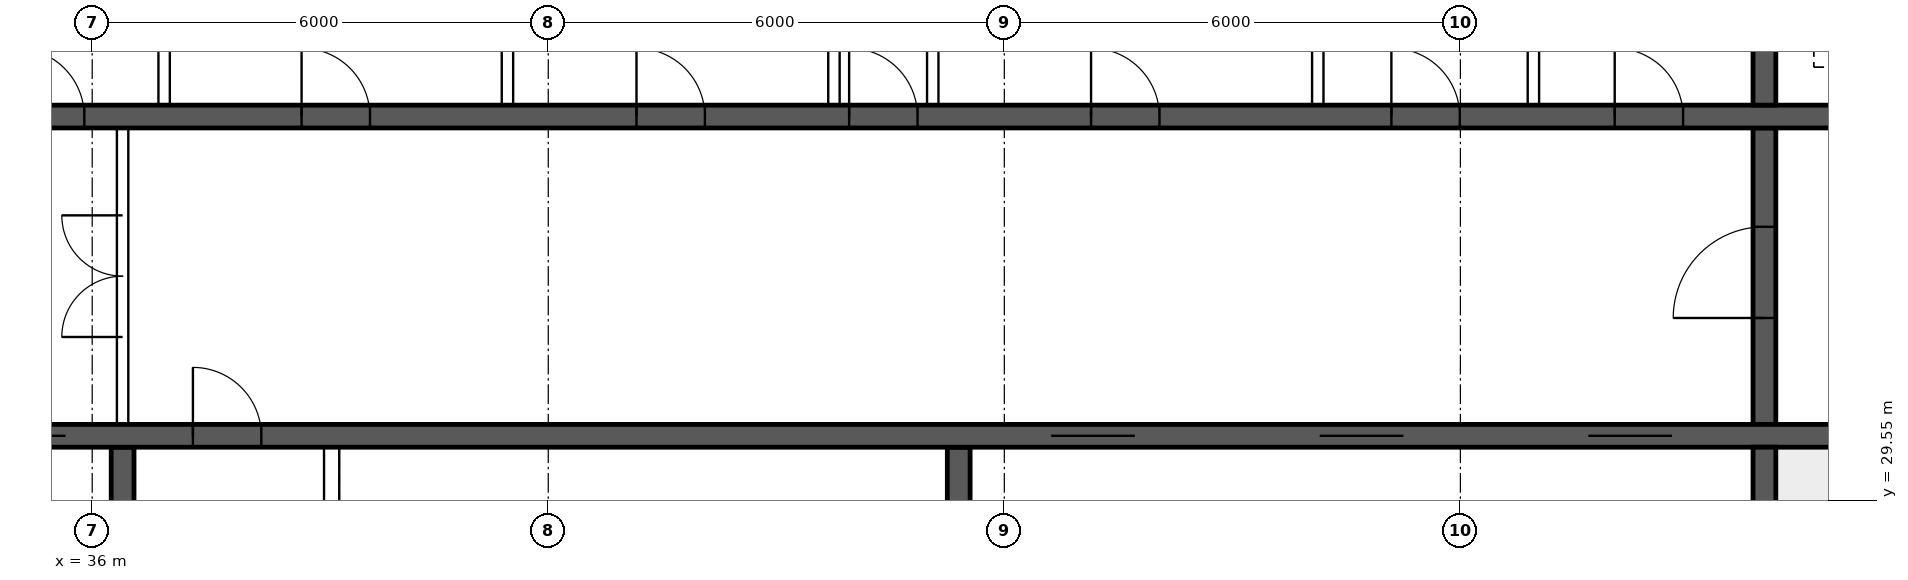
"""IFC4 building model, lengths in metres.
Left out: names, types, materials, properties, quantities, classifications, styles, units other than length and angle.
Written with IfcOpenShell. Run it as: python <this file> out.ifc"""

import sys

from ifc_helpers import new_model, si_unit, direction, frame, frame_2d, origin, place, context, subcontext, project, spatial, rectangle, extrude, element, fill, save


model = new_model("IFC4")
c1 = context("Model", 3, precision=1e-05, world=origin(), true_north=direction((0.0, 1.0)))
c2 = subcontext(c1, "Body", "Model", "MODEL_VIEW")
j1 = project(units=[si_unit("LENGTHUNIT", "METRE"), si_unit("PLANEANGLEUNIT", "RADIAN")], contexts=[c1])
p1 = place(None, origin())
s1 = spatial("IfcSite", under=j1, at=p1, CompositionType="ELEMENT")
p2 = place(p1, origin())
s2 = spatial("IfcBuilding", under=s1, at=p2, CompositionType="ELEMENT")
p3 = place(p2, frame((0.0, 0.0, 95.65)))
s3 = spatial("IfcBuildingStorey", under=s2, at=p3, CompositionType="ELEMENT", Elevation=95.65)
p4 = place(p3, frame((18.475, 30.4, 0.0), z_axis=(0.0, 0.0, 1.0), x_axis=(1.0, 0.0, 0.0)))
e1 = element("IfcWall", 1, at=p4, inside=s3, PredefinedType="SHEAR", context=c2, shape_type="SweptSolid", body=[
    extrude(rectangle(XDim=47.05, YDim=0.3, at=frame_2d((23.525, 0.0))), origin(), (0.0, 0.0, 1.0), 3.75),
])
p5 = place(p4, frame((0.4, 0.0, 0.0)))
e2 = element("IfcOpeningElement", 2, at=p5, cuts=e1, PredefinedType="OPENING", context=c2, shape_type="SweptSolid", body=[
    extrude(rectangle(XDim=1.0, YDim=2.1, at=frame_2d((0.5, 1.05))), frame((0.0, 0.16, 0.0), z_axis=(0.0, -1.0, 0.0), x_axis=(1.0, 0.0, 0.0)), (0.0, 0.0, 1.0), 0.32),
])
p6 = place(p4, frame((45.65, 0.0, 0.0)))
e3 = element("IfcOpeningElement", 3, at=p6, cuts=e1, PredefinedType="OPENING", context=c2, shape_type="SweptSolid", body=[
    extrude(rectangle(XDim=1.0, YDim=2.1, at=frame_2d((0.5, 1.05))), frame((0.0, 0.16, 0.0), z_axis=(0.0, -1.0, 0.0), x_axis=(1.0, 0.0, 0.0)), (0.0, 0.0, 1.0), 0.32),
])
p7 = place(p4, frame((8.275, 0.0, 0.0)))
e4 = element("IfcOpeningElement", 4, at=p7, cuts=e1, PredefinedType="OPENING", context=c2, shape_type="SweptSolid", body=[
    extrude(rectangle(XDim=1.1, YDim=2.1, at=frame_2d((0.55, 1.05))), frame((0.0, 0.16, 0.0), z_axis=(0.0, -1.0, 0.0), x_axis=(1.0, 0.0, 0.0)), (0.0, 0.0, 1.0), 0.32),
])
p8 = place(p4, frame((10.875, 0.0, 0.0)))
e5 = element("IfcOpeningElement", 5, at=p8, cuts=e1, PredefinedType="OPENING", context=c2, shape_type="SweptSolid", body=[
    extrude(rectangle(XDim=1.1, YDim=2.1, at=frame_2d((0.55, 1.05))), frame((0.0, 0.16, 0.0), z_axis=(0.0, -1.0, 0.0), x_axis=(1.0, 0.0, 0.0)), (0.0, 0.0, 1.0), 0.32),
])
p9 = place(p4, frame((13.475, 0.0, 0.0)))
e6 = element("IfcOpeningElement", 6, at=p9, cuts=e1, PredefinedType="OPENING", context=c2, shape_type="SweptSolid", body=[
    extrude(rectangle(XDim=1.1, YDim=2.1, at=frame_2d((0.55, 1.05))), frame((0.0, 0.16, 0.0), z_axis=(0.0, -1.0, 0.0), x_axis=(1.0, 0.0, 0.0)), (0.0, 0.0, 1.0), 0.32),
])
p10 = place(p4, frame((16.075, 0.0, 0.0)))
e7 = element("IfcOpeningElement", 7, at=p10, cuts=e1, PredefinedType="OPENING", context=c2, shape_type="SweptSolid", body=[
    extrude(rectangle(XDim=1.1, YDim=2.1, at=frame_2d((0.55, 1.05))), frame((0.0, 0.16, 0.0), z_axis=(0.0, -1.0, 0.0), x_axis=(1.0, 0.0, 0.0)), (0.0, 0.0, 1.0), 0.32),
])
p11 = place(p4, frame((18.85, 0.0, 0.0)))
e8 = element("IfcOpeningElement", 8, at=p11, cuts=e1, PredefinedType="OPENING", context=c2, shape_type="SweptSolid", body=[
    extrude(rectangle(XDim=0.9, YDim=2.1, at=frame_2d((0.45, 1.05))), frame((0.0, 0.16, 0.0), z_axis=(0.0, -1.0, 0.0), x_axis=(1.0, 0.0, 0.0)), (0.0, 0.0, 1.0), 0.32),
])
p12 = place(p4, frame((30.142, 0.0, 0.0)))
e9 = element("IfcOpeningElement", 9, at=p12, cuts=e1, PredefinedType="OPENING", context=c2, shape_type="SweptSolid", body=[
    extrude(rectangle(XDim=1.1, YDim=2.1, at=frame_2d((0.55, 1.05))), frame((0.0, 0.16, 0.0), z_axis=(0.0, -1.0, 0.0), x_axis=(1.0, 0.0, 0.0)), (0.0, 0.0, 1.0), 0.32),
])
p13 = place(p4, frame((33.675, 0.0, 0.0)))
e10 = element("IfcOpeningElement", 10, at=p13, cuts=e1, PredefinedType="OPENING", context=c2, shape_type="SweptSolid", body=[
    extrude(rectangle(XDim=1.1, YDim=2.1, at=frame_2d((0.55, 1.05))), frame((0.0, 0.16, 0.0), z_axis=(0.0, -1.0, 0.0), x_axis=(1.0, 0.0, 0.0)), (0.0, 0.0, 1.0), 0.32),
])
p14 = place(p4, frame((37.208, 0.0, 0.0)))
e11 = element("IfcOpeningElement", 11, at=p14, cuts=e1, PredefinedType="OPENING", context=c2, shape_type="SweptSolid", body=[
    extrude(rectangle(XDim=1.1, YDim=2.1, at=frame_2d((0.55, 1.05))), frame((0.0, 0.16, 0.0), z_axis=(0.0, -1.0, 0.0), x_axis=(1.0, 0.0, 0.0)), (0.0, 0.0, 1.0), 0.32),
])
p15 = place(p3, frame((18.475, 34.6, 0.0), z_axis=(0.0, 0.0, 1.0), x_axis=(1.0, 0.0, 0.0)))
e12 = element("IfcWall", 12, at=p15, inside=s3, PredefinedType="SHEAR", context=c2, shape_type="SweptSolid", body=[
    extrude(rectangle(XDim=47.05, YDim=0.3, at=frame_2d((23.525, 0.0))), origin(), (0.0, 0.0, 1.0), 3.75),
])
p16 = place(p15, frame((0.9, 0.0, 0.0)))
e13 = element("IfcOpeningElement", 13, at=p16, cuts=e12, PredefinedType="OPENING", context=c2, shape_type="SweptSolid", body=[
    extrude(rectangle(XDim=1.1, YDim=2.1, at=frame_2d((0.55, 1.05))), frame((0.0, 0.16, 0.0), z_axis=(0.0, -1.0, 0.0), x_axis=(1.0, 0.0, 0.0)), (0.0, 0.0, 1.0), 0.32),
])
p17 = place(p15, frame((45.05, 0.0, 0.0)))
e14 = element("IfcOpeningElement", 14, at=p17, cuts=e12, PredefinedType="OPENING", context=c2, shape_type="SweptSolid", body=[
    extrude(rectangle(XDim=1.1, YDim=2.1, at=frame_2d((0.55, 1.05))), frame((0.0, 0.16, 0.0), z_axis=(0.0, -1.0, 0.0), x_axis=(1.0, 0.0, 0.0)), (0.0, 0.0, 1.0), 0.32),
])
p18 = place(p15, frame((4.125, 0.0, 0.0)))
e15 = element("IfcOpeningElement", 15, at=p18, cuts=e12, PredefinedType="OPENING", context=c2, shape_type="SweptSolid", body=[
    extrude(rectangle(XDim=0.9, YDim=2.1, at=frame_2d((0.45, 1.05))), frame((0.0, 0.16, 0.0), z_axis=(0.0, -1.0, 0.0), x_axis=(1.0, 0.0, 0.0)), (0.0, 0.0, 1.0), 0.32),
])
p19 = place(p15, frame((42.025, 0.0, 0.0)))
e16 = element("IfcOpeningElement", 16, at=p19, cuts=e12, PredefinedType="OPENING", context=c2, shape_type="SweptSolid", body=[
    extrude(rectangle(XDim=0.9, YDim=2.1, at=frame_2d((0.45, 1.05))), frame((0.0, 0.16, 0.0), z_axis=(0.0, -1.0, 0.0), x_axis=(1.0, 0.0, 0.0)), (0.0, 0.0, 1.0), 0.32),
])
p20 = place(p15, frame((8.9, 0.0, 0.0)))
e17 = element("IfcOpeningElement", 17, at=p20, cuts=e12, PredefinedType="OPENING", context=c2, shape_type="SweptSolid", body=[
    extrude(rectangle(XDim=0.9, YDim=2.1, at=frame_2d((0.45, 1.05))), frame((0.0, 0.16, 0.0), z_axis=(0.0, -1.0, 0.0), x_axis=(1.0, 0.0, 0.0)), (0.0, 0.0, 1.0), 0.32),
])
p21 = place(p15, frame((12.874, 0.0, 0.0)))
e18 = element("IfcOpeningElement", 18, at=p21, cuts=e12, PredefinedType="OPENING", context=c2, shape_type="SweptSolid", body=[
    extrude(rectangle(XDim=0.9, YDim=2.1, at=frame_2d((0.45, 1.05))), frame((0.0, 0.16, 0.0), z_axis=(0.0, -1.0, 0.0), x_axis=(1.0, 0.0, 0.0)), (0.0, 0.0, 1.0), 0.32),
])
p22 = place(p15, frame((16.521, 0.0, 0.0)))
e19 = element("IfcOpeningElement", 19, at=p22, cuts=e12, PredefinedType="OPENING", context=c2, shape_type="SweptSolid", body=[
    extrude(rectangle(XDim=0.9, YDim=2.1, at=frame_2d((0.45, 1.05))), frame((0.0, 0.16, 0.0), z_axis=(0.0, -1.0, 0.0), x_axis=(1.0, 0.0, 0.0)), (0.0, 0.0, 1.0), 0.32),
])
p23 = place(p15, frame((20.28, 0.0, 0.0)))
e20 = element("IfcOpeningElement", 20, at=p23, cuts=e12, PredefinedType="OPENING", context=c2, shape_type="SweptSolid", body=[
    extrude(rectangle(XDim=0.9, YDim=2.1, at=frame_2d((0.45, 1.05))), frame((0.0, 0.16, 0.0), z_axis=(0.0, -1.0, 0.0), x_axis=(1.0, 0.0, 0.0)), (0.0, 0.0, 1.0), 0.32),
])
p24 = place(p15, frame((24.686, 0.0, 0.0)))
e21 = element("IfcOpeningElement", 21, at=p24, cuts=e12, PredefinedType="OPENING", context=c2, shape_type="SweptSolid", body=[
    extrude(rectangle(XDim=0.9, YDim=2.1, at=frame_2d((0.45, 1.05))), frame((0.0, 0.16, 0.0), z_axis=(0.0, -1.0, 0.0), x_axis=(1.0, 0.0, 0.0)), (0.0, 0.0, 1.0), 0.32),
])
p25 = place(p15, frame((27.483, 0.0, 0.0)))
e22 = element("IfcOpeningElement", 22, at=p25, cuts=e12, PredefinedType="OPENING", context=c2, shape_type="SweptSolid", body=[
    extrude(rectangle(XDim=0.9, YDim=2.1, at=frame_2d((0.45, 1.05))), frame((0.0, 0.16, 0.0), z_axis=(0.0, -1.0, 0.0), x_axis=(1.0, 0.0, 0.0)), (0.0, 0.0, 1.0), 0.32),
])
p26 = place(p15, frame((30.666, 0.0, 0.0)))
e23 = element("IfcOpeningElement", 23, at=p26, cuts=e12, PredefinedType="OPENING", context=c2, shape_type="SweptSolid", body=[
    extrude(rectangle(XDim=0.9, YDim=2.1, at=frame_2d((0.45, 1.05))), frame((0.0, 0.16, 0.0), z_axis=(0.0, -1.0, 0.0), x_axis=(1.0, 0.0, 0.0)), (0.0, 0.0, 1.0), 0.32),
])
p27 = place(p15, frame((34.617, 0.0, 0.0)))
e24 = element("IfcOpeningElement", 24, at=p27, cuts=e12, PredefinedType="OPENING", context=c2, shape_type="SweptSolid", body=[
    extrude(rectangle(XDim=0.9, YDim=2.1, at=frame_2d((0.45, 1.05))), frame((0.0, 0.16, 0.0), z_axis=(0.0, -1.0, 0.0), x_axis=(1.0, 0.0, 0.0)), (0.0, 0.0, 1.0), 0.32),
])
p28 = place(p15, frame((37.555, 0.0, 0.0)))
e25 = element("IfcOpeningElement", 25, at=p28, cuts=e12, PredefinedType="OPENING", context=c2, shape_type="SweptSolid", body=[
    extrude(rectangle(XDim=0.9, YDim=2.1, at=frame_2d((0.45, 1.05))), frame((0.0, 0.16, 0.0), z_axis=(0.0, -1.0, 0.0), x_axis=(1.0, 0.0, 0.0)), (0.0, 0.0, 1.0), 0.32),
])
p29 = place(p3, frame((58.0, 26.275, 0.0), z_axis=(0.0, 0.0, 1.0), x_axis=(0.0, 1.0, 0.0)))
e26 = element("IfcWall", 26, at=p29, inside=s3, PredefinedType="SHEAR", context=c2, shape_type="SweptSolid", body=[
    extrude(rectangle(XDim=3.975, YDim=0.3, at=frame_2d((1.988, 0.0))), origin(), (0.0, 0.0, 1.0), 3.75),
])
p30 = place(p3, frame((58.0, 30.55, 0.0), z_axis=(0.0, 0.0, 1.0), x_axis=(0.0, 1.0, 0.0)))
e27 = element("IfcWall", 27, at=p30, inside=s3, PredefinedType="SHEAR", context=c2, shape_type="SweptSolid", body=[
    extrude(rectangle(XDim=3.9, YDim=0.3, at=frame_2d((1.95, 0.0))), origin(), (0.0, 0.0, 1.0), 3.75),
])
p31 = place(p30, frame((1.4, 0.0, 0.0)))
e28 = element("IfcOpeningElement", 28, at=p31, cuts=e27, PredefinedType="OPENING", context=c2, shape_type="SweptSolid", body=[
    extrude(rectangle(XDim=1.2, YDim=2.1, at=frame_2d((0.6, 1.05))), frame((0.0, 0.16, 0.0), z_axis=(0.0, -1.0, 0.0), x_axis=(1.0, 0.0, 0.0)), (0.0, 0.0, 1.0), 0.32),
])
p32 = place(p3, frame((58.0, 34.75, 0.0), z_axis=(0.0, 0.0, 1.0), x_axis=(0.0, 1.0, 0.0)))
e29 = element("IfcWall", 29, at=p32, inside=s3, PredefinedType="SHEAR", context=c2, shape_type="SweptSolid", body=[
    extrude(rectangle(XDim=2.975, YDim=0.3, at=frame_2d((1.488, 0.0))), origin(), (0.0, 0.0, 1.0), 3.75),
])
for number, where, z_axis, x_axis in (
    (30, (36.4, 26.275, 0.0), (0.0, 0.0, 1.0), (0.0, 1.0, 0.0)),
    (31, (47.4, 26.275, 0.0), (0.0, 0.0, 1.0), (0.0, 1.0, 0.0)),
):
    element("IfcWall", number, at=place(p3, frame(where, z_axis=z_axis, x_axis=x_axis)), inside=s3, PredefinedType="SHEAR", context=c2, shape_type="SweptSolid", body=[
        extrude(rectangle(XDim=3.975, YDim=0.3, at=frame_2d((1.988, 0.0))), origin(), (0.0, 0.0, 1.0), 3.75),
    ])
p33 = place(p3, frame((36.4, 30.55, 0.0), z_axis=(0.0, 0.0, 1.0), x_axis=(0.0, 1.0, 0.0)))
e32 = element("IfcWall", 32, at=p33, inside=s3, PredefinedType="SOLIDWALL", context=c2, shape_type="SweptSolid", body=[
    extrude(rectangle(XDim=3.9, YDim=0.15, at=frame_2d((1.95, 0.0))), origin(), (0.0, 0.0, 1.0), 3.3),
])
p34 = place(p33, frame((1.15, 0.0, 0.0)))
e33 = element("IfcOpeningElement", 33, at=p34, cuts=e32, PredefinedType="OPENING", context=c2, shape_type="SweptSolid", body=[
    extrude(rectangle(XDim=1.6, YDim=2.1, at=frame_2d((0.8, 1.05))), frame((0.0, 0.085, 0.0), z_axis=(0.0, -1.0, 0.0), x_axis=(1.0, 0.0, 0.0)), (0.0, 0.0, 1.0), 0.17),
])
for number, where, z_axis, x_axis in (
    (34, (36.946, 34.75, 0.0), (0.0, 0.0, 1.0), (0.0, 1.0, 0.0)),
    (35, (41.463, 34.75, 0.0), (0.0, 0.0, 1.0), (0.0, 1.0, 0.0)),
    (36, (45.758, 34.75, 0.0), (0.0, 0.0, 1.0), (0.0, 1.0, 0.0)),
    (37, (47.058, 34.75, 0.0), (0.0, 0.0, 1.0), (0.0, 1.0, 0.0)),
    (38, (52.124, 34.75, 0.0), (0.0, 0.0, 1.0), (0.0, 1.0, 0.0)),
    (39, (54.961, 34.75, 0.0), (0.0, 0.0, 1.0), (0.0, 1.0, 0.0)),
):
    element("IfcWall", number, at=place(p3, frame(where, z_axis=z_axis, x_axis=x_axis)), inside=s3, PredefinedType="SOLIDWALL", context=c2, shape_type="SweptSolid", body=[
        extrude(rectangle(XDim=2.975, YDim=0.15, at=frame_2d((1.488, 0.0))), origin(), (0.0, 0.0, 1.0), 3.3),
    ])
p35 = place(p3, frame((39.15, 26.275, 0.0), z_axis=(0.0, 0.0, 1.0), x_axis=(0.0, 1.0, 0.0)))
e40 = element("IfcWall", 40, at=p35, inside=s3, PredefinedType="SOLIDWALL", context=c2, shape_type="SweptSolid", body=[
    extrude(rectangle(XDim=3.975, YDim=0.2, at=frame_2d((1.988, 0.0))), origin(), (0.0, 0.0, 1.0), 3.3),
])
p36 = place(p34, origin())
e41 = element("IfcDoor", 41, at=p36, inside=s3, OperationType="DOUBLE_DOOR_SINGLE_SWING", PredefinedType="DOOR", context=c2, shape_type="SweptSolid", body=[
    extrude(rectangle(XDim=1.6, YDim=2.1, at=frame_2d((0.8, 1.05))), frame((0.0, 0.025, 0.0), z_axis=(0.0, -1.0, 0.0), x_axis=(1.0, 0.0, 0.0)), (0.0, 0.0, 1.0), 0.05),
])
fill(e33, e41)
p37 = place(p31, origin())
e42 = element("IfcDoor", 42, at=p37, inside=s3, OperationType="SINGLE_SWING_LEFT", PredefinedType="DOOR", context=c2, shape_type="SweptSolid", body=[
    extrude(rectangle(XDim=1.2, YDim=2.1, at=frame_2d((0.6, 1.05))), frame((0.0, 0.025, 0.0), z_axis=(0.0, -1.0, 0.0), x_axis=(1.0, 0.0, 0.0)), (0.0, 0.0, 1.0), 0.05),
])
fill(e28, e42)
p38 = place(p22, origin())
e43 = element("IfcDoor", 43, at=p38, inside=s3, OperationType="SINGLE_SWING_LEFT", PredefinedType="DOOR", context=c2, shape_type="SweptSolid", body=[
    extrude(rectangle(XDim=0.9, YDim=2.1, at=frame_2d((0.45, 1.05))), frame((0.0, 0.025, 0.0), z_axis=(0.0, -1.0, 0.0), x_axis=(1.0, 0.0, 0.0)), (0.0, 0.0, 1.0), 0.05),
])
fill(e19, e43)
p39 = place(p23, origin())
e44 = element("IfcDoor", 44, at=p39, inside=s3, OperationType="SINGLE_SWING_LEFT", PredefinedType="DOOR", context=c2, shape_type="SweptSolid", body=[
    extrude(rectangle(XDim=0.9, YDim=2.1, at=frame_2d((0.45, 1.05))), frame((0.0, 0.025, 0.0), z_axis=(0.0, -1.0, 0.0), x_axis=(1.0, 0.0, 0.0)), (0.0, 0.0, 1.0), 0.05),
])
fill(e20, e44)
p40 = place(p24, origin())
e45 = element("IfcDoor", 45, at=p40, inside=s3, OperationType="SINGLE_SWING_LEFT", PredefinedType="DOOR", context=c2, shape_type="SweptSolid", body=[
    extrude(rectangle(XDim=0.9, YDim=2.1, at=frame_2d((0.45, 1.05))), frame((0.0, 0.025, 0.0), z_axis=(0.0, -1.0, 0.0), x_axis=(1.0, 0.0, 0.0)), (0.0, 0.0, 1.0), 0.05),
])
fill(e21, e45)
p41 = place(p25, origin())
e46 = element("IfcDoor", 46, at=p41, inside=s3, OperationType="SINGLE_SWING_LEFT", PredefinedType="DOOR", context=c2, shape_type="SweptSolid", body=[
    extrude(rectangle(XDim=0.9, YDim=2.1, at=frame_2d((0.45, 1.05))), frame((0.0, 0.025, 0.0), z_axis=(0.0, -1.0, 0.0), x_axis=(1.0, 0.0, 0.0)), (0.0, 0.0, 1.0), 0.05),
])
fill(e22, e46)
p42 = place(p26, origin())
e47 = element("IfcDoor", 47, at=p42, inside=s3, OperationType="SINGLE_SWING_LEFT", PredefinedType="DOOR", context=c2, shape_type="SweptSolid", body=[
    extrude(rectangle(XDim=0.9, YDim=2.1, at=frame_2d((0.45, 1.05))), frame((0.0, 0.025, 0.0), z_axis=(0.0, -1.0, 0.0), x_axis=(1.0, 0.0, 0.0)), (0.0, 0.0, 1.0), 0.05),
])
fill(e23, e47)
p43 = place(p27, origin())
e48 = element("IfcDoor", 48, at=p43, inside=s3, OperationType="SINGLE_SWING_LEFT", PredefinedType="DOOR", context=c2, shape_type="SweptSolid", body=[
    extrude(rectangle(XDim=0.9, YDim=2.1, at=frame_2d((0.45, 1.05))), frame((0.0, 0.025, 0.0), z_axis=(0.0, -1.0, 0.0), x_axis=(1.0, 0.0, 0.0)), (0.0, 0.0, 1.0), 0.05),
])
fill(e24, e48)
p44 = place(p28, origin())
e49 = element("IfcDoor", 49, at=p44, inside=s3, OperationType="SINGLE_SWING_LEFT", PredefinedType="DOOR", context=c2, shape_type="SweptSolid", body=[
    extrude(rectangle(XDim=0.9, YDim=2.1, at=frame_2d((0.45, 1.05))), frame((0.0, 0.025, 0.0), z_axis=(0.0, -1.0, 0.0), x_axis=(1.0, 0.0, 0.0)), (0.0, 0.0, 1.0), 0.05),
])
fill(e25, e49)
p45 = place(p10, origin())
e50 = element("IfcDoor", 50, at=p45, inside=s3, OperationType="DOUBLE_DOOR_SLIDING", PredefinedType="DOOR", context=c2, shape_type="SweptSolid", body=[
    extrude(rectangle(XDim=1.1, YDim=2.1, at=frame_2d((0.55, 1.05))), frame((0.0, 0.025, 0.0), z_axis=(0.0, -1.0, 0.0), x_axis=(1.0, 0.0, 0.0)), (0.0, 0.0, 1.0), 0.05),
])
fill(e7, e50)
p46 = place(p11, origin())
e51 = element("IfcDoor", 51, at=p46, inside=s3, OperationType="SINGLE_SWING_LEFT", PredefinedType="DOOR", context=c2, shape_type="SweptSolid", body=[
    extrude(rectangle(XDim=0.9, YDim=2.1, at=frame_2d((0.45, 1.05))), frame((0.0, 0.025, 0.0), z_axis=(0.0, -1.0, 0.0), x_axis=(1.0, 0.0, 0.0)), (0.0, 0.0, 1.0), 0.05),
])
fill(e8, e51)
p47 = place(p12, origin())
e52 = element("IfcDoor", 52, at=p47, inside=s3, OperationType="DOUBLE_DOOR_SLIDING", PredefinedType="DOOR", context=c2, shape_type="SweptSolid", body=[
    extrude(rectangle(XDim=1.1, YDim=2.1, at=frame_2d((0.55, 1.05))), frame((0.0, 0.025, 0.0), z_axis=(0.0, -1.0, 0.0), x_axis=(1.0, 0.0, 0.0)), (0.0, 0.0, 1.0), 0.05),
])
fill(e9, e52)
p48 = place(p13, origin())
e53 = element("IfcDoor", 53, at=p48, inside=s3, OperationType="DOUBLE_DOOR_SLIDING", PredefinedType="DOOR", context=c2, shape_type="SweptSolid", body=[
    extrude(rectangle(XDim=1.1, YDim=2.1, at=frame_2d((0.55, 1.05))), frame((0.0, 0.025, 0.0), z_axis=(0.0, -1.0, 0.0), x_axis=(1.0, 0.0, 0.0)), (0.0, 0.0, 1.0), 0.05),
])
fill(e10, e53)
p49 = place(p14, origin())
e54 = element("IfcDoor", 54, at=p49, inside=s3, OperationType="DOUBLE_DOOR_SLIDING", PredefinedType="DOOR", context=c2, shape_type="SweptSolid", body=[
    extrude(rectangle(XDim=1.1, YDim=2.1, at=frame_2d((0.55, 1.05))), frame((0.0, 0.025, 0.0), z_axis=(0.0, -1.0, 0.0), x_axis=(1.0, 0.0, 0.0)), (0.0, 0.0, 1.0), 0.05),
])
fill(e11, e54)
save(model, sys.argv[1])
